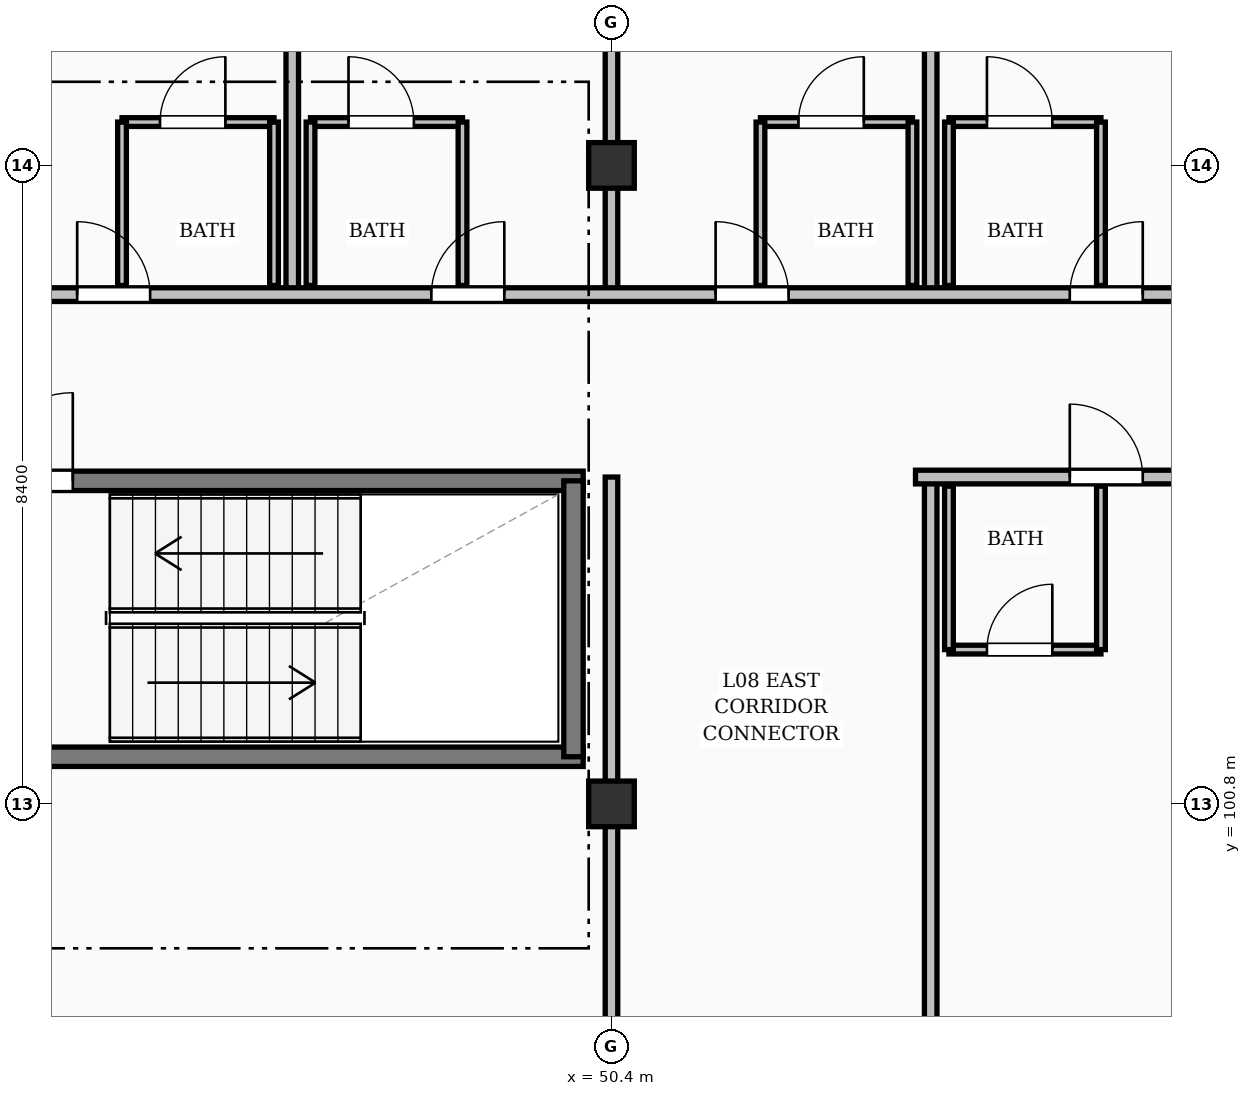
"""IFC4 building model, lengths in metres.
Left out: names, types, materials, properties, quantities, classifications, styles, units other than length and angle.
Written with IfcOpenShell. Run it as: python <this file> out.ifc"""

import sys

from ifc_helpers import new_model, si_unit, direction, frame, frame_2d, origin, origin_2d, place, context, subcontext, project, spatial, rectangle, extrude, element, fill, save


model = new_model("IFC4")
c1 = context("Model", 3, precision=1e-05, world=origin(), true_north=direction((0.0, 1.0)))
c2 = subcontext(c1, "Body", "Model", "MODEL_VIEW")
j1 = project(units=[si_unit("LENGTHUNIT", "METRE"), si_unit("PLANEANGLEUNIT", "RADIAN")], contexts=[c1])
p1 = place(None, origin())
s1 = spatial("IfcSite", under=j1, at=p1, CompositionType="ELEMENT")
p2 = place(p1, origin())
s2 = spatial("IfcBuilding", under=s1, at=p2, CompositionType="ELEMENT")
p3 = place(p2, frame((0.0, 0.0, 28.56)))
s3 = spatial("IfcBuildingStorey", under=s2, at=p3, CompositionType="ELEMENT", Elevation=28.56)
for number, where, z_axis, x_axis in (
    (1, (50.4, 100.8, 0.0), (0.0, 0.0, 1.0), (1.0, 0.0, 0.0)),
    (2, (50.4, 109.2, 0.0), (0.0, 0.0, 1.0), (1.0, 0.0, 0.0)),
):
    element("IfcColumn", number, at=place(p3, frame(where, z_axis=z_axis, x_axis=x_axis)), inside=s3, PredefinedType="COLUMN", context=c2, shape_type="SweptSolid", body=[
        extrude(rectangle(XDim=0.6, YDim=0.6, at=origin_2d()), origin(), (0.0, 0.0, 1.0), 3.36),
    ])
p4 = place(p3, frame((41.802, 101.42, 0.0), z_axis=(0.0, 0.0, 1.0), x_axis=(1.0, 0.0, 0.0)))
e3 = element("IfcWall", 3, at=p4, inside=s3, PredefinedType="SOLIDWALL", context=c2, shape_type="SweptSolid", body=[
    extrude(rectangle(XDim=8.225, YDim=0.255, at=frame_2d((4.113, 0.0))), origin(), (0.0, 0.0, 1.0), 3.12),
])
p5 = place(p3, frame((41.802, 105.05, 0.0), z_axis=(0.0, 0.0, 1.0), x_axis=(1.0, 0.0, 0.0)))
e4 = element("IfcWall", 4, at=p5, inside=s3, PredefinedType="SOLIDWALL", context=c2, shape_type="SweptSolid", body=[
    extrude(rectangle(XDim=8.225, YDim=0.255, at=frame_2d((4.113, 0.0))), origin(), (0.0, 0.0, 1.0), 3.12),
])
p6 = place(p5, frame((0.35, 0.0, 0.0)))
e5 = element("IfcOpeningElement", 5, at=p6, cuts=e4, PredefinedType="OPENING", context=c2, shape_type="SweptSolid", body=[
    extrude(rectangle(XDim=1.16, YDim=2.15, at=frame_2d((0.58, 1.075))), frame((0.0, 0.137, 0.0), z_axis=(0.0, -1.0, 0.0), x_axis=(1.0, 0.0, 0.0)), (0.0, 0.0, 1.0), 0.275),
])
p7 = place(p3, frame((49.9, 101.42, 0.0), z_axis=(0.0, 0.0, 1.0), x_axis=(0.0, 1.0, 0.0)))
e6 = element("IfcWall", 6, at=p7, inside=s3, PredefinedType="SOLIDWALL", context=c2, shape_type="SweptSolid", body=[
    extrude(rectangle(XDim=3.63, YDim=0.255, at=frame_2d((1.815, 0.0))), origin(), (0.0, 0.0, 1.0), 3.12),
])
p8 = place(p3, frame((43.96, 109.77, 0.0), z_axis=(0.0, 0.0, 1.0), x_axis=(1.0, 0.0, 0.0)))
e7 = element("IfcWall", 7, at=p8, inside=s3, PredefinedType="PARTITIONING", context=c2, shape_type="SweptSolid", body=[
    extrude(rectangle(XDim=2.0, YDim=0.115, at=frame_2d((1.0, 0.0))), origin(), (0.0, 0.0, 1.0), 3.12),
])
p9 = place(p8, frame((0.5, 0.0, 0.0)))
e8 = element("IfcOpeningElement", 8, at=p9, cuts=e7, PredefinedType="OPENING", context=c2, shape_type="SweptSolid", body=[
    extrude(rectangle(XDim=0.86, YDim=2.05, at=frame_2d((0.43, 1.025))), frame((0.0, 0.067, 0.0), z_axis=(0.0, -1.0, 0.0), x_axis=(1.0, 0.0, 0.0)), (0.0, 0.0, 1.0), 0.135),
])
p10 = place(p3, frame((43.96, 107.62, 0.0), z_axis=(0.0, 0.0, 1.0), x_axis=(0.0, 1.0, 0.0)))
e9 = element("IfcWall", 9, at=p10, inside=s3, PredefinedType="PARTITIONING", context=c2, shape_type="SweptSolid", body=[
    extrude(rectangle(XDim=2.15, YDim=0.115, at=frame_2d((1.075, 0.0))), origin(), (0.0, 0.0, 1.0), 2.642),
])
p11 = place(p3, frame((45.96, 107.62, 0.0), z_axis=(0.0, 0.0, 1.0), x_axis=(0.0, 1.0, 0.0)))
e10 = element("IfcWall", 10, at=p11, inside=s3, PredefinedType="PARTITIONING", context=c2, shape_type="SweptSolid", body=[
    extrude(rectangle(XDim=2.15, YDim=0.115, at=frame_2d((1.075, 0.0))), origin(), (0.0, 0.0, 1.0), 3.12),
])
p12 = place(p3, frame((46.44, 109.77, 0.0), z_axis=(0.0, 0.0, 1.0), x_axis=(1.0, 0.0, 0.0)))
e11 = element("IfcWall", 11, at=p12, inside=s3, PredefinedType="PARTITIONING", context=c2, shape_type="SweptSolid", body=[
    extrude(rectangle(XDim=2.0, YDim=0.115, at=frame_2d((1.0, 0.0))), origin(), (0.0, 0.0, 1.0), 3.12),
])
p13 = place(p12, frame((0.5, 0.0, 0.0)))
e12 = element("IfcOpeningElement", 12, at=p13, cuts=e11, PredefinedType="OPENING", context=c2, shape_type="SweptSolid", body=[
    extrude(rectangle(XDim=0.86, YDim=2.05, at=frame_2d((0.43, 1.025))), frame((0.0, 0.067, 0.0), z_axis=(0.0, -1.0, 0.0), x_axis=(1.0, 0.0, 0.0)), (0.0, 0.0, 1.0), 0.135),
])
p14 = place(p3, frame((46.44, 107.62, 0.0), z_axis=(0.0, 0.0, 1.0), x_axis=(0.0, 1.0, 0.0)))
e13 = element("IfcWall", 13, at=p14, inside=s3, PredefinedType="PARTITIONING", context=c2, shape_type="SweptSolid", body=[
    extrude(rectangle(XDim=2.15, YDim=0.115, at=frame_2d((1.075, 0.0))), origin(), (0.0, 0.0, 1.0), 3.12),
])
p15 = place(p3, frame((48.44, 107.62, 0.0), z_axis=(0.0, 0.0, 1.0), x_axis=(0.0, 1.0, 0.0)))
e14 = element("IfcWall", 14, at=p15, inside=s3, PredefinedType="PARTITIONING", context=c2, shape_type="SweptSolid", body=[
    extrude(rectangle(XDim=2.15, YDim=0.115, at=frame_2d((1.075, 0.0))), origin(), (0.0, 0.0, 1.0), 2.642),
])
p16 = place(p3, frame((46.2, 107.5, 0.0), z_axis=(0.0, 0.0, 1.0), x_axis=(0.0, 1.0, 0.0)))
e15 = element("IfcWall", 15, at=p16, inside=s3, PredefinedType="PARTITIONING", context=c2, shape_type="SweptSolid", body=[
    extrude(rectangle(XDim=6.688, YDim=0.165, at=frame_2d((3.344, 0.0))), origin(), (0.0, 0.0, 1.0), 3.12),
])
p17 = place(p3, frame((52.36, 109.77, 0.0), z_axis=(0.0, 0.0, 1.0), x_axis=(1.0, 0.0, 0.0)))
e16 = element("IfcWall", 16, at=p17, inside=s3, PredefinedType="PARTITIONING", context=c2, shape_type="SweptSolid", body=[
    extrude(rectangle(XDim=2.0, YDim=0.115, at=frame_2d((1.0, 0.0))), origin(), (0.0, 0.0, 1.0), 3.12),
])
p18 = place(p17, frame((0.5, 0.0, 0.0)))
e17 = element("IfcOpeningElement", 17, at=p18, cuts=e16, PredefinedType="OPENING", context=c2, shape_type="SweptSolid", body=[
    extrude(rectangle(XDim=0.86, YDim=2.05, at=frame_2d((0.43, 1.025))), frame((0.0, 0.067, 0.0), z_axis=(0.0, -1.0, 0.0), x_axis=(1.0, 0.0, 0.0)), (0.0, 0.0, 1.0), 0.135),
])
for number, where, z_axis, x_axis in (
    (18, (52.36, 107.62, 0.0), (0.0, 0.0, 1.0), (0.0, 1.0, 0.0)),
    (19, (54.36, 107.62, 0.0), (0.0, 0.0, 1.0), (0.0, 1.0, 0.0)),
):
    element("IfcWall", number, at=place(p3, frame(where, z_axis=z_axis, x_axis=x_axis)), inside=s3, PredefinedType="PARTITIONING", context=c2, shape_type="SweptSolid", body=[
        extrude(rectangle(XDim=2.15, YDim=0.115, at=frame_2d((1.075, 0.0))), origin(), (0.0, 0.0, 1.0), 3.12),
    ])
p19 = place(p3, frame((54.84, 109.77, 0.0), z_axis=(0.0, 0.0, 1.0), x_axis=(1.0, 0.0, 0.0)))
e20 = element("IfcWall", 20, at=p19, inside=s3, PredefinedType="PARTITIONING", context=c2, shape_type="SweptSolid", body=[
    extrude(rectangle(XDim=2.0, YDim=0.115, at=frame_2d((1.0, 0.0))), origin(), (0.0, 0.0, 1.0), 3.12),
])
p20 = place(p19, frame((0.5, 0.0, 0.0)))
e21 = element("IfcOpeningElement", 21, at=p20, cuts=e20, PredefinedType="OPENING", context=c2, shape_type="SweptSolid", body=[
    extrude(rectangle(XDim=0.86, YDim=2.05, at=frame_2d((0.43, 1.025))), frame((0.0, 0.067, 0.0), z_axis=(0.0, -1.0, 0.0), x_axis=(1.0, 0.0, 0.0)), (0.0, 0.0, 1.0), 0.135),
])
for number, where, z_axis, x_axis in (
    (22, (54.84, 107.62, 0.0), (0.0, 0.0, 1.0), (0.0, 1.0, 0.0)),
    (23, (56.84, 107.62, 0.0), (0.0, 0.0, 1.0), (0.0, 1.0, 0.0)),
):
    element("IfcWall", number, at=place(p3, frame(where, z_axis=z_axis, x_axis=x_axis)), inside=s3, PredefinedType="PARTITIONING", context=c2, shape_type="SweptSolid", body=[
        extrude(rectangle(XDim=2.15, YDim=0.115, at=frame_2d((1.075, 0.0))), origin(), (0.0, 0.0, 1.0), 3.12),
    ])
p21 = place(p3, frame((54.6, 107.5, 0.0), z_axis=(0.0, 0.0, 1.0), x_axis=(0.0, 1.0, 0.0)))
e24 = element("IfcWall", 24, at=p21, inside=s3, PredefinedType="PARTITIONING", context=c2, shape_type="SweptSolid", body=[
    extrude(rectangle(XDim=6.675, YDim=0.165, at=frame_2d((3.337, 0.0))), origin(), (0.0, 0.0, 1.0), 3.12),
])
p22 = place(p3, frame((50.4, 107.5, 0.0), z_axis=(0.0, 0.0, 1.0), x_axis=(0.0, 1.0, 0.0)))
e25 = element("IfcWall", 25, at=p22, inside=s3, PredefinedType="PARTITIONING", context=c2, shape_type="SweptSolid", body=[
    extrude(rectangle(XDim=6.55, YDim=0.165, at=frame_2d((3.275, 0.0))), origin(), (0.0, 0.0, 1.0), 2.41),
])
p23 = place(p3, frame((40.66, 107.5, 0.0), z_axis=(0.0, 0.0, 1.0), x_axis=(1.0, 0.0, 0.0)))
e26 = element("IfcWall", 26, at=p23, inside=s3, PredefinedType="PARTITIONING", context=c2, shape_type="SweptSolid", body=[
    extrude(rectangle(XDim=26.378, YDim=0.18, at=frame_2d((13.189, 0.0))), origin(), (0.0, 0.0, 1.0), 3.12),
])
p24 = place(p23, frame((0.2, 0.0, 0.0)))
e27 = element("IfcOpeningElement", 27, at=p24, cuts=e26, PredefinedType="OPENING", context=c2, shape_type="SweptSolid", body=[
    extrude(rectangle(XDim=0.94, YDim=2.1, at=frame_2d((0.47, 1.05))), frame((0.0, 0.1, 0.0), z_axis=(0.0, -1.0, 0.0), x_axis=(1.0, 0.0, 0.0)), (0.0, 0.0, 1.0), 0.2),
])
p25 = place(p23, frame((2.71, 0.0, 0.0)))
e28 = element("IfcOpeningElement", 28, at=p25, cuts=e26, PredefinedType="OPENING", context=c2, shape_type="SweptSolid", body=[
    extrude(rectangle(XDim=0.96, YDim=2.15, at=frame_2d((0.48, 1.075))), frame((0.0, 0.1, 0.0), z_axis=(0.0, -1.0, 0.0), x_axis=(1.0, 0.0, 0.0)), (0.0, 0.0, 1.0), 0.2),
])
p26 = place(p23, frame((7.37, 0.0, 0.0)))
e29 = element("IfcOpeningElement", 29, at=p26, cuts=e26, PredefinedType="OPENING", context=c2, shape_type="SweptSolid", body=[
    extrude(rectangle(XDim=0.96, YDim=2.15, at=frame_2d((0.48, 1.075))), frame((0.0, 0.1, 0.0), z_axis=(0.0, -1.0, 0.0), x_axis=(1.0, 0.0, 0.0)), (0.0, 0.0, 1.0), 0.2),
])
p27 = place(p23, frame((11.11, 0.0, 0.0)))
e30 = element("IfcOpeningElement", 30, at=p27, cuts=e26, PredefinedType="OPENING", context=c2, shape_type="SweptSolid", body=[
    extrude(rectangle(XDim=0.96, YDim=2.15, at=frame_2d((0.48, 1.075))), frame((0.0, 0.1, 0.0), z_axis=(0.0, -1.0, 0.0), x_axis=(1.0, 0.0, 0.0)), (0.0, 0.0, 1.0), 0.2),
])
p28 = place(p23, frame((15.77, 0.0, 0.0)))
e31 = element("IfcOpeningElement", 31, at=p28, cuts=e26, PredefinedType="OPENING", context=c2, shape_type="SweptSolid", body=[
    extrude(rectangle(XDim=0.96, YDim=2.15, at=frame_2d((0.48, 1.075))), frame((0.0, 0.1, 0.0), z_axis=(0.0, -1.0, 0.0), x_axis=(1.0, 0.0, 0.0)), (0.0, 0.0, 1.0), 0.2),
])
p29 = place(p23, frame((19.51, 0.0, 0.0)))
e32 = element("IfcOpeningElement", 32, at=p29, cuts=e26, PredefinedType="OPENING", context=c2, shape_type="SweptSolid", body=[
    extrude(rectangle(XDim=0.96, YDim=2.15, at=frame_2d((0.48, 1.075))), frame((0.0, 0.1, 0.0), z_axis=(0.0, -1.0, 0.0), x_axis=(1.0, 0.0, 0.0)), (0.0, 0.0, 1.0), 0.2),
])
p30 = place(p23, frame((24.17, 0.0, 0.0)))
e33 = element("IfcOpeningElement", 33, at=p30, cuts=e26, PredefinedType="OPENING", context=c2, shape_type="SweptSolid", body=[
    extrude(rectangle(XDim=0.96, YDim=2.15, at=frame_2d((0.48, 1.075))), frame((0.0, 0.1, 0.0), z_axis=(0.0, -1.0, 0.0), x_axis=(1.0, 0.0, 0.0)), (0.0, 0.0, 1.0), 0.2),
])
p31 = place(p3, frame((54.84, 102.83, 0.0), z_axis=(0.0, 0.0, 1.0), x_axis=(1.0, 0.0, 0.0)))
e34 = element("IfcWall", 34, at=p31, inside=s3, PredefinedType="PARTITIONING", context=c2, shape_type="SweptSolid", body=[
    extrude(rectangle(XDim=2.0, YDim=0.115, at=frame_2d((1.0, 0.0))), origin(), (0.0, 0.0, 1.0), 3.12),
])
p32 = place(p31, frame((0.5, 0.0, 0.0)))
e35 = element("IfcOpeningElement", 35, at=p32, cuts=e34, PredefinedType="OPENING", context=c2, shape_type="SweptSolid", body=[
    extrude(rectangle(XDim=0.86, YDim=2.05, at=frame_2d((0.43, 1.025))), frame((0.0, 0.067, 0.0), z_axis=(0.0, -1.0, 0.0), x_axis=(1.0, 0.0, 0.0)), (0.0, 0.0, 1.0), 0.135),
])
for number, where, z_axis, x_axis in (
    (36, (54.84, 102.83, 0.0), (0.0, 0.0, 1.0), (0.0, 1.0, 0.0)),
    (37, (56.84, 102.83, 0.0), (0.0, 0.0, 1.0), (0.0, 1.0, 0.0)),
):
    element("IfcWall", number, at=place(p3, frame(where, z_axis=z_axis, x_axis=x_axis)), inside=s3, PredefinedType="PARTITIONING", context=c2, shape_type="SweptSolid", body=[
        extrude(rectangle(XDim=2.15, YDim=0.115, at=frame_2d((1.075, 0.0))), origin(), (0.0, 0.0, 1.0), 3.12),
    ])
p33 = place(p3, frame((54.6, 92.625, 0.0), z_axis=(0.0, 0.0, 1.0), x_axis=(0.0, 1.0, 0.0)))
e38 = element("IfcWall", 38, at=p33, inside=s3, PredefinedType="PARTITIONING", context=c2, shape_type="SweptSolid", body=[
    extrude(rectangle(XDim=12.475, YDim=0.165, at=frame_2d((6.238, 0.0))), origin(), (0.0, 0.0, 1.0), 3.12),
])
p34 = place(p3, frame((50.4, 92.75, 0.0), z_axis=(0.0, 0.0, 1.0), x_axis=(0.0, 1.0, 0.0)))
e39 = element("IfcWall", 39, at=p34, inside=s3, PredefinedType="PARTITIONING", context=c2, shape_type="SweptSolid", body=[
    extrude(rectangle(XDim=12.35, YDim=0.165, at=frame_2d((6.175, 0.0))), origin(), (0.0, 0.0, 1.0), 2.455),
])
p35 = place(p3, frame((54.4, 105.1, 0.0), z_axis=(0.0, 0.0, 1.0), x_axis=(1.0, 0.0, 0.0)))
e40 = element("IfcWall", 40, at=p35, inside=s3, PredefinedType="PARTITIONING", context=c2, shape_type="SweptSolid", body=[
    extrude(rectangle(XDim=12.638, YDim=0.18, at=frame_2d((6.319, 0.0))), origin(), (0.0, 0.0, 1.0), 3.12),
])
p36 = place(p35, frame((2.03, 0.0, 0.0)))
e41 = element("IfcOpeningElement", 41, at=p36, cuts=e40, PredefinedType="OPENING", context=c2, shape_type="SweptSolid", body=[
    extrude(rectangle(XDim=0.96, YDim=2.15, at=frame_2d((0.48, 1.075))), frame((0.0, 0.1, 0.0), z_axis=(0.0, -1.0, 0.0), x_axis=(1.0, 0.0, 0.0)), (0.0, 0.0, 1.0), 0.2),
])
p37 = place(p35, frame((5.77, 0.0, 0.0)))
e42 = element("IfcOpeningElement", 42, at=p37, cuts=e40, PredefinedType="OPENING", context=c2, shape_type="SweptSolid", body=[
    extrude(rectangle(XDim=0.96, YDim=2.15, at=frame_2d((0.48, 1.075))), frame((0.0, 0.1, 0.0), z_axis=(0.0, -1.0, 0.0), x_axis=(1.0, 0.0, 0.0)), (0.0, 0.0, 1.0), 0.2),
])
p38 = place(p35, frame((10.43, 0.0, 0.0)))
e43 = element("IfcOpeningElement", 43, at=p38, cuts=e40, PredefinedType="OPENING", context=c2, shape_type="SweptSolid", body=[
    extrude(rectangle(XDim=0.96, YDim=2.15, at=frame_2d((0.48, 1.075))), frame((0.0, 0.1, 0.0), z_axis=(0.0, -1.0, 0.0), x_axis=(1.0, 0.0, 0.0)), (0.0, 0.0, 1.0), 0.2),
])
p39 = place(p6, origin())
e44 = element("IfcDoor", 44, at=p39, inside=s3, OperationType="SINGLE_SWING_RIGHT", PredefinedType="DOOR", context=c2, shape_type="SweptSolid", body=[
    extrude(rectangle(XDim=1.16, YDim=2.15, at=frame_2d((0.58, 1.075))), frame((0.0, 0.025, 0.0), z_axis=(0.0, -1.0, 0.0), x_axis=(1.0, 0.0, 0.0)), (0.0, 0.0, 1.0), 0.05),
])
fill(e5, e44)
p40 = place(p9, origin())
e45 = element("IfcDoor", 45, at=p40, inside=s3, OperationType="SINGLE_SWING_RIGHT", PredefinedType="DOOR", context=c2, shape_type="SweptSolid", body=[
    extrude(rectangle(XDim=0.86, YDim=2.05, at=frame_2d((0.43, 1.025))), frame((0.0, 0.025, 0.0), z_axis=(0.0, -1.0, 0.0), x_axis=(1.0, 0.0, 0.0)), (0.0, 0.0, 1.0), 0.05),
])
fill(e8, e45)
p41 = place(p13, origin())
e46 = element("IfcDoor", 46, at=p41, inside=s3, OperationType="SINGLE_SWING_LEFT", PredefinedType="DOOR", context=c2, shape_type="SweptSolid", body=[
    extrude(rectangle(XDim=0.86, YDim=2.05, at=frame_2d((0.43, 1.025))), frame((0.0, 0.025, 0.0), z_axis=(0.0, -1.0, 0.0), x_axis=(1.0, 0.0, 0.0)), (0.0, 0.0, 1.0), 0.05),
])
fill(e12, e46)
p42 = place(p18, origin())
e47 = element("IfcDoor", 47, at=p42, inside=s3, OperationType="SINGLE_SWING_RIGHT", PredefinedType="DOOR", context=c2, shape_type="SweptSolid", body=[
    extrude(rectangle(XDim=0.86, YDim=2.05, at=frame_2d((0.43, 1.025))), frame((0.0, 0.025, 0.0), z_axis=(0.0, -1.0, 0.0), x_axis=(1.0, 0.0, 0.0)), (0.0, 0.0, 1.0), 0.05),
])
fill(e17, e47)
p43 = place(p20, origin())
e48 = element("IfcDoor", 48, at=p43, inside=s3, OperationType="SINGLE_SWING_LEFT", PredefinedType="DOOR", context=c2, shape_type="SweptSolid", body=[
    extrude(rectangle(XDim=0.86, YDim=2.05, at=frame_2d((0.43, 1.025))), frame((0.0, 0.025, 0.0), z_axis=(0.0, -1.0, 0.0), x_axis=(1.0, 0.0, 0.0)), (0.0, 0.0, 1.0), 0.05),
])
fill(e21, e48)
p44 = place(p25, origin())
e49 = element("IfcDoor", 49, at=p44, inside=s3, OperationType="SINGLE_SWING_LEFT", PredefinedType="DOOR", context=c2, shape_type="SweptSolid", body=[
    extrude(rectangle(XDim=0.96, YDim=2.15, at=frame_2d((0.48, 1.075))), frame((0.0, 0.025, 0.0), z_axis=(0.0, -1.0, 0.0), x_axis=(1.0, 0.0, 0.0)), (0.0, 0.0, 1.0), 0.05),
])
fill(e28, e49)
p45 = place(p26, origin())
e50 = element("IfcDoor", 50, at=p45, inside=s3, OperationType="SINGLE_SWING_RIGHT", PredefinedType="DOOR", context=c2, shape_type="SweptSolid", body=[
    extrude(rectangle(XDim=0.96, YDim=2.15, at=frame_2d((0.48, 1.075))), frame((0.0, 0.025, 0.0), z_axis=(0.0, -1.0, 0.0), x_axis=(1.0, 0.0, 0.0)), (0.0, 0.0, 1.0), 0.05),
])
fill(e29, e50)
p46 = place(p27, origin())
e51 = element("IfcDoor", 51, at=p46, inside=s3, OperationType="SINGLE_SWING_LEFT", PredefinedType="DOOR", context=c2, shape_type="SweptSolid", body=[
    extrude(rectangle(XDim=0.96, YDim=2.15, at=frame_2d((0.48, 1.075))), frame((0.0, 0.025, 0.0), z_axis=(0.0, -1.0, 0.0), x_axis=(1.0, 0.0, 0.0)), (0.0, 0.0, 1.0), 0.05),
])
fill(e30, e51)
p47 = place(p28, origin())
e52 = element("IfcDoor", 52, at=p47, inside=s3, OperationType="SINGLE_SWING_RIGHT", PredefinedType="DOOR", context=c2, shape_type="SweptSolid", body=[
    extrude(rectangle(XDim=0.96, YDim=2.15, at=frame_2d((0.48, 1.075))), frame((0.0, 0.025, 0.0), z_axis=(0.0, -1.0, 0.0), x_axis=(1.0, 0.0, 0.0)), (0.0, 0.0, 1.0), 0.05),
])
fill(e31, e52)
p48 = place(p32, origin())
e53 = element("IfcDoor", 53, at=p48, inside=s3, OperationType="SINGLE_SWING_RIGHT", PredefinedType="DOOR", context=c2, shape_type="SweptSolid", body=[
    extrude(rectangle(XDim=0.86, YDim=2.05, at=frame_2d((0.43, 1.025))), frame((0.0, 0.025, 0.0), z_axis=(0.0, -1.0, 0.0), x_axis=(1.0, 0.0, 0.0)), (0.0, 0.0, 1.0), 0.05),
])
fill(e35, e53)
p49 = place(p36, origin())
e54 = element("IfcDoor", 54, at=p49, inside=s3, OperationType="SINGLE_SWING_LEFT", PredefinedType="DOOR", context=c2, shape_type="SweptSolid", body=[
    extrude(rectangle(XDim=0.96, YDim=2.15, at=frame_2d((0.48, 1.075))), frame((0.0, 0.025, 0.0), z_axis=(0.0, -1.0, 0.0), x_axis=(1.0, 0.0, 0.0)), (0.0, 0.0, 1.0), 0.05),
])
fill(e41, e54)
save(model, sys.argv[1])
